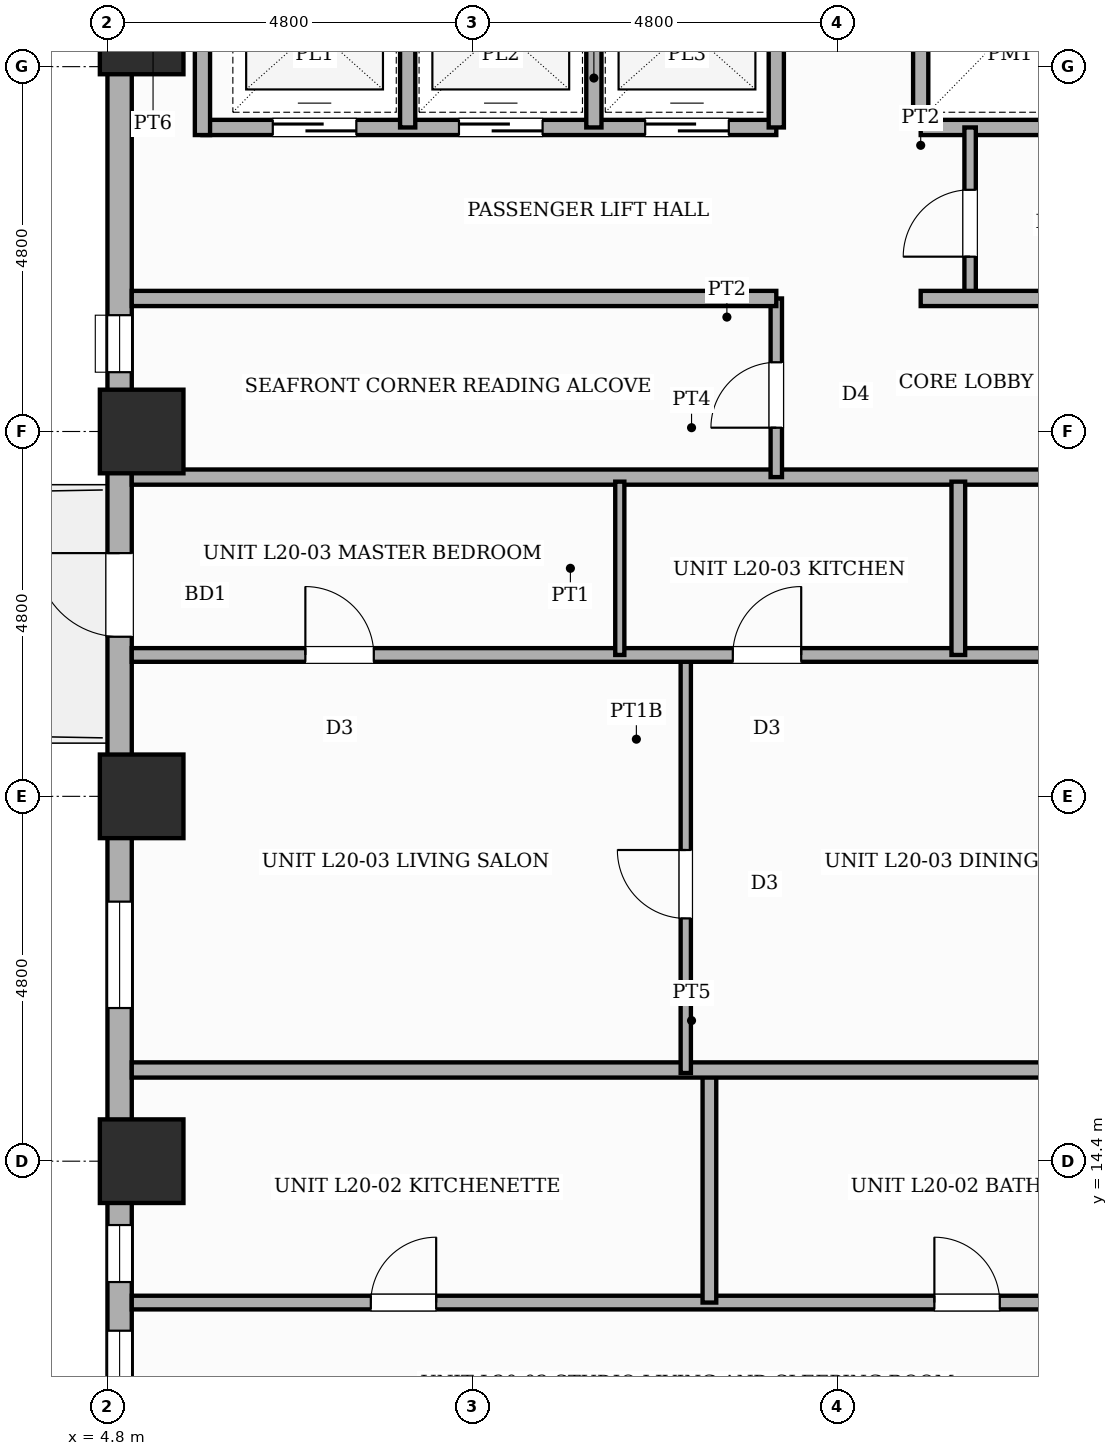
"""IFC4 building model, lengths in metres.
Left out: names, types, materials, properties, quantities, classifications, styles, units other than length and angle.
Written with IfcOpenShell. Run it as: python <this file> out.ifc"""

import sys

from ifc_helpers import new_model, si_unit, direction, frame, frame_2d, origin, origin_2d, place, context, subcontext, project, spatial, rectangle, extrude, element, fill, save


model = new_model("IFC4")
c1 = context("Model", 3, precision=1e-05, world=origin(), true_north=direction((0.0, 1.0)))
c2 = subcontext(c1, "Body", "Model", "MODEL_VIEW")
j1 = project(units=[si_unit("LENGTHUNIT", "METRE"), si_unit("PLANEANGLEUNIT", "RADIAN")], contexts=[c1])
p1 = place(None, origin())
s1 = spatial("IfcSite", under=j1, at=p1, CompositionType="ELEMENT")
p2 = place(p1, origin())
s2 = spatial("IfcBuilding", under=s1, at=p2, CompositionType="ELEMENT")
p3 = place(p2, frame((0.0, 0.0, 79.0)))
s3 = spatial("IfcBuildingStorey", under=s2, at=p3, CompositionType="ELEMENT", Elevation=79.0)
for number, where, z_axis, x_axis in (
    (1, (5.25, 14.4, 0.0), (0.0, 0.0, 1.0), (1.0, 0.0, 0.0)),
    (2, (5.25, 19.2, 0.0), (0.0, 0.0, 1.0), (1.0, 0.0, 0.0)),
    (3, (5.25, 24.0, 0.0), (0.0, 0.0, 1.0), (1.0, 0.0, 0.0)),
    (4, (5.25, 29.25, 0.0), (0.0, 0.0, 1.0), (1.0, 0.0, 0.0)),
):
    element("IfcColumn", number, at=place(p3, frame(where, z_axis=z_axis, x_axis=x_axis)), inside=s3, PredefinedType="COLUMN", context=c2, shape_type="SweptSolid", body=[
        extrude(rectangle(XDim=1.1, YDim=1.1, at=origin_2d()), origin(), (0.0, 0.0, 1.0), 3.6),
    ])
p4 = place(p3, frame((4.96, 7.2, 0.0), z_axis=(0.0, 0.0, 1.0), x_axis=(0.0, 1.0, 0.0)))
e5 = element("IfcWall", 5, at=p4, inside=s3, PredefinedType="STANDARD", context=c2, shape_type="SweptSolid", body=[
    extrude(rectangle(XDim=38.4, YDim=0.32, at=frame_2d((19.2, 0.0))), origin(), (0.0, 0.0, 1.0), 2.53),
])
p5 = place(p4, frame((14.1, 0.0, 0.0)))
e6 = element("IfcOpeningElement", 6, at=p5, cuts=e5, PredefinedType="OPENING", context=c2, shape_type="SweptSolid", body=[
    extrude(rectangle(XDim=1.1, YDim=2.15, at=frame_2d((0.55, 1.075))), frame((0.0, 0.17, 0.0), z_axis=(0.0, -1.0, 0.0), x_axis=(1.0, 0.0, 0.0)), (0.0, 0.0, 1.0), 0.34),
])
p6 = place(p4, frame((3.57, 0.0, 0.65)))
e7 = element("IfcOpeningElement", 7, at=p6, cuts=e5, PredefinedType="OPENING", context=c2, shape_type="SweptSolid", body=[
    extrude(rectangle(XDim=1.4, YDim=1.1, at=frame_2d((0.7, 0.55))), frame((0.0, 0.17, 0.0), z_axis=(0.0, -1.0, 0.0), x_axis=(1.0, 0.0, 0.0)), (0.0, 0.0, 1.0), 0.34),
])
p7 = place(p4, frame((0.611, 0.0, 0.45)))
e8 = element("IfcOpeningElement", 8, at=p7, cuts=e5, PredefinedType="OPENING", context=c2, shape_type="SweptSolid", body=[
    extrude(rectangle(XDim=0.95, YDim=1.8, at=frame_2d((0.475, 0.9))), frame((0.0, 0.17, 0.0), z_axis=(0.0, -1.0, 0.0), x_axis=(1.0, 0.0, 0.0)), (0.0, 0.0, 1.0), 0.34),
])
p8 = place(p4, frame((5.61, 0.0, 0.45)))
e9 = element("IfcOpeningElement", 9, at=p8, cuts=e5, PredefinedType="OPENING", context=c2, shape_type="SweptSolid", body=[
    extrude(rectangle(XDim=0.75, YDim=1.8, at=frame_2d((0.375, 0.9))), frame((0.0, 0.17, 0.0), z_axis=(0.0, -1.0, 0.0), x_axis=(1.0, 0.0, 0.0)), (0.0, 0.0, 1.0), 0.34),
])
p9 = place(p4, frame((9.215, 0.0, 0.65)))
e10 = element("IfcOpeningElement", 10, at=p9, cuts=e5, PredefinedType="OPENING", context=c2, shape_type="SweptSolid", body=[
    extrude(rectangle(XDim=1.4, YDim=1.1, at=frame_2d((0.7, 0.55))), frame((0.0, 0.17, 0.0), z_axis=(0.0, -1.0, 0.0), x_axis=(1.0, 0.0, 0.0)), (0.0, 0.0, 1.0), 0.34),
])
p10 = place(p4, frame((17.58, 0.0, 0.45)))
e11 = element("IfcOpeningElement", 11, at=p10, cuts=e5, PredefinedType="OPENING", context=c2, shape_type="SweptSolid", body=[
    extrude(rectangle(XDim=0.75, YDim=1.8, at=frame_2d((0.375, 0.9))), frame((0.0, 0.17, 0.0), z_axis=(0.0, -1.0, 0.0), x_axis=(1.0, 0.0, 0.0)), (0.0, 0.0, 1.0), 0.34),
])
p11 = place(p3, frame((6.05, 28.0, 0.0), z_axis=(0.0, 0.0, 1.0), x_axis=(1.0, 0.0, 0.0)))
e12 = element("IfcWall", 12, at=p11, inside=s3, PredefinedType="POLYGONAL", context=c2, shape_type="SweptSolid", body=[
    extrude(rectangle(XDim=7.55, YDim=0.2, at=frame_2d((3.775, 0.0))), origin(), (0.0, 0.0, 1.0), 3.35),
])
p12 = place(p11, frame((0.925, 0.0, 0.0)))
e13 = element("IfcOpeningElement", 13, at=p12, cuts=e12, PredefinedType="OPENING", context=c2, shape_type="SweptSolid", body=[
    extrude(rectangle(XDim=1.1, YDim=2.15, at=frame_2d((0.55, 1.075))), frame((0.0, 0.11, 0.0), z_axis=(0.0, -1.0, 0.0), x_axis=(1.0, 0.0, 0.0)), (0.0, 0.0, 1.0), 0.22),
])
p13 = place(p11, frame((3.375, 0.0, 0.0)))
e14 = element("IfcOpeningElement", 14, at=p13, cuts=e12, PredefinedType="OPENING", context=c2, shape_type="SweptSolid", body=[
    extrude(rectangle(XDim=1.1, YDim=2.15, at=frame_2d((0.55, 1.075))), frame((0.0, 0.11, 0.0), z_axis=(0.0, -1.0, 0.0), x_axis=(1.0, 0.0, 0.0)), (0.0, 0.0, 1.0), 0.22),
])
p14 = place(p11, frame((5.825, 0.0, 0.0)))
e15 = element("IfcOpeningElement", 15, at=p14, cuts=e12, PredefinedType="OPENING", context=c2, shape_type="SweptSolid", body=[
    extrude(rectangle(XDim=1.1, YDim=2.15, at=frame_2d((0.55, 1.075))), frame((0.0, 0.11, 0.0), z_axis=(0.0, -1.0, 0.0), x_axis=(1.0, 0.0, 0.0)), (0.0, 0.0, 1.0), 0.22),
])
p15 = place(p3, frame((15.5, 28.0, 0.0), z_axis=(0.0, 0.0, 1.0), x_axis=(1.0, 0.0, 0.0)))
e16 = element("IfcWall", 16, at=p15, inside=s3, PredefinedType="POLYGONAL", context=c2, shape_type="SweptSolid", body=[
    extrude(rectangle(XDim=7.25, YDim=0.2, at=frame_2d((3.625, 0.0))), origin(), (0.0, 0.0, 1.0), 3.35),
])
p16 = place(p3, frame((6.05, 27.9, 0.0), z_axis=(0.0, 0.0, 1.0), x_axis=(0.0, 1.0, 0.0)))
e17 = element("IfcWall", 17, at=p16, inside=s3, PredefinedType="POLYGONAL", context=c2, shape_type="SweptSolid", body=[
    extrude(rectangle(XDim=3.0, YDim=0.2, at=frame_2d((1.5, 0.0))), origin(), (0.0, 0.0, 1.0), 3.35),
])
for number, where, z_axis, x_axis in (
    (18, (13.6, 28.0, 0.0), (0.0, 0.0, 1.0), (0.0, 1.0, 0.0)),
    (19, (15.5, 28.0, 0.0), (0.0, 0.0, 1.0), (0.0, 1.0, 0.0)),
    (20, (8.75, 28.0, 0.0), (0.0, 0.0, 1.0), (0.0, 1.0, 0.0)),
    (21, (11.2, 28.0, 0.0), (0.0, 0.0, 1.0), (0.0, 1.0, 0.0)),
):
    element("IfcWall", number, at=place(p3, frame(where, z_axis=z_axis, x_axis=x_axis)), inside=s3, PredefinedType="POLYGONAL", context=c2, shape_type="SweptSolid", body=[
        extrude(rectangle(XDim=2.9, YDim=0.2, at=frame_2d((1.45, 0.0))), origin(), (0.0, 0.0, 1.0), 3.35),
    ])
p17 = place(p3, frame((16.15, 25.75, 0.0), z_axis=(0.0, 0.0, 1.0), x_axis=(0.0, 1.0, 0.0)))
e22 = element("IfcWall", 22, at=p17, inside=s3, PredefinedType="PARTITIONING", context=c2, shape_type="SweptSolid", body=[
    extrude(rectangle(XDim=2.25, YDim=0.15, at=frame_2d((1.125, 0.0))), origin(), (0.0, 0.0, 1.0), 3.35),
])
p18 = place(p17, frame((0.55, 0.0, 0.0)))
e23 = element("IfcOpeningElement", 23, at=p18, cuts=e22, PredefinedType="OPENING", context=c2, shape_type="SweptSolid", body=[
    extrude(rectangle(XDim=0.88, YDim=2.1, at=frame_2d((0.44, 1.05))), frame((0.0, 0.085, 0.0), z_axis=(0.0, -1.0, 0.0), x_axis=(1.0, 0.0, 0.0)), (0.0, 0.0, 1.0), 0.17),
])
p19 = place(p3, frame((5.12, 23.4, 0.0), z_axis=(0.0, 0.0, 1.0), x_axis=(1.0, 0.0, 0.0)))
e24 = element("IfcWall", 24, at=p19, inside=s3, PredefinedType="PARTITIONING", context=c2, shape_type="SweptSolid", body=[
    extrude(rectangle(XDim=14.73, YDim=0.2, at=frame_2d((7.365, 0.0))), origin(), (0.0, 0.0, 1.0), 3.35),
])
p20 = place(p3, frame((15.5, 25.75, 0.0), z_axis=(0.0, 0.0, 1.0), x_axis=(1.0, 0.0, 0.0)))
e25 = element("IfcWall", 25, at=p20, inside=s3, PredefinedType="PARTITIONING", context=c2, shape_type="SweptSolid", body=[
    extrude(rectangle(XDim=8.18, YDim=0.2, at=frame_2d((4.09, 0.0))), origin(), (0.0, 0.0, 1.0), 3.35),
])
p21 = place(p3, frame((13.6, 23.4, 0.0), z_axis=(0.0, 0.0, 1.0), x_axis=(0.0, 1.0, 0.0)))
e26 = element("IfcWall", 26, at=p21, inside=s3, PredefinedType="PARTITIONING", context=c2, shape_type="SweptSolid", body=[
    extrude(rectangle(XDim=2.35, YDim=0.15, at=frame_2d((1.175, 0.0))), origin(), (0.0, 0.0, 1.0), 3.35),
])
p22 = place(p21, frame((0.65, 0.0, 0.0)))
e27 = element("IfcOpeningElement", 27, at=p22, cuts=e26, PredefinedType="OPENING", context=c2, shape_type="SweptSolid", body=[
    extrude(rectangle(XDim=0.86, YDim=2.1, at=frame_2d((0.43, 1.05))), frame((0.0, 0.085, 0.0), z_axis=(0.0, -1.0, 0.0), x_axis=(1.0, 0.0, 0.0)), (0.0, 0.0, 1.0), 0.17),
])
p23 = place(p3, frame((5.12, 25.75, 0.0), z_axis=(0.0, 0.0, 1.0), x_axis=(1.0, 0.0, 0.0)))
e28 = element("IfcWall", 28, at=p23, inside=s3, PredefinedType="PARTITIONING", context=c2, shape_type="SweptSolid", body=[
    extrude(rectangle(XDim=8.48, YDim=0.2, at=frame_2d((4.24, 0.0))), origin(), (0.0, 0.0, 1.0), 3.35),
])
p24 = place(p3, frame((5.12, 12.54, 0.0), z_axis=(0.0, 0.0, 1.0), x_axis=(1.0, 0.0, 0.0)))
e29 = element("IfcWall", 29, at=p24, inside=s3, PredefinedType="PLUMBINGWALL", context=c2, shape_type="SweptSolid", body=[
    extrude(rectangle(XDim=14.67, YDim=0.18, at=frame_2d((7.335, 0.0))), origin(), (0.0, 0.0, 1.0), 3.35),
])
p25 = place(p24, frame((3.145, 0.0, 0.0)))
e30 = element("IfcOpeningElement", 30, at=p25, cuts=e29, PredefinedType="OPENING", context=c2, shape_type="SweptSolid", body=[
    extrude(rectangle(XDim=0.86, YDim=2.1, at=frame_2d((0.43, 1.05))), frame((0.0, 0.1, 0.0), z_axis=(0.0, -1.0, 0.0), x_axis=(1.0, 0.0, 0.0)), (0.0, 0.0, 1.0), 0.2),
])
p26 = place(p24, frame((10.56, 0.0, 0.0)))
e31 = element("IfcOpeningElement", 31, at=p26, cuts=e29, PredefinedType="OPENING", context=c2, shape_type="SweptSolid", body=[
    extrude(rectangle(XDim=0.86, YDim=2.1, at=frame_2d((0.43, 1.05))), frame((0.0, 0.1, 0.0), z_axis=(0.0, -1.0, 0.0), x_axis=(1.0, 0.0, 0.0)), (0.0, 0.0, 1.0), 0.2),
])
p27 = place(p3, frame((12.72, 12.54, 0.0), z_axis=(0.0, 0.0, 1.0), x_axis=(0.0, 1.0, 0.0)))
e32 = element("IfcWall", 32, at=p27, inside=s3, PredefinedType="PLUMBINGWALL", context=c2, shape_type="SweptSolid", body=[
    extrude(rectangle(XDim=3.1, YDim=0.18, at=frame_2d((1.55, 0.0))), origin(), (0.0, 0.0, 1.0), 3.35),
])
p28 = place(p3, frame((5.12, 15.6, 0.0), z_axis=(0.0, 0.0, 1.0), x_axis=(1.0, 0.0, 0.0)))
e33 = element("IfcWall", 33, at=p28, inside=s3, PredefinedType="SOLIDWALL", context=c2, shape_type="SweptSolid", body=[
    extrude(rectangle(XDim=14.73, YDim=0.2, at=frame_2d((7.365, 0.0))), origin(), (0.0, 0.0, 1.0), 3.35),
])
p29 = place(p3, frame((12.409, 15.56, 0.0), z_axis=(0.0, 0.0, 1.0), x_axis=(0.0, 1.0, 0.0)))
e34 = element("IfcWall", 34, at=p29, inside=s3, PredefinedType="PARTITIONING", context=c2, shape_type="SweptSolid", body=[
    extrude(rectangle(XDim=5.5, YDim=0.135, at=frame_2d((2.75, 0.0))), origin(), (0.0, 0.0, 1.0), 3.35),
])
p30 = place(p29, frame((2.034, 0.0, 0.0)))
e35 = element("IfcOpeningElement", 35, at=p30, cuts=e34, PredefinedType="OPENING", context=c2, shape_type="SweptSolid", body=[
    extrude(rectangle(XDim=0.9, YDim=2.15, at=frame_2d((0.45, 1.075))), frame((0.0, 0.078, 0.0), z_axis=(0.0, -1.0, 0.0), x_axis=(1.0, 0.0, 0.0)), (0.0, 0.0, 1.0), 0.155),
])
p31 = place(p3, frame((5.12, 21.06, 0.0), z_axis=(0.0, 0.0, 1.0), x_axis=(1.0, 0.0, 0.0)))
e36 = element("IfcWall", 36, at=p31, inside=s3, PredefinedType="PLUMBINGWALL", context=c2, shape_type="SweptSolid", body=[
    extrude(rectangle(XDim=14.67, YDim=0.18, at=frame_2d((7.335, 0.0))), origin(), (0.0, 0.0, 1.0), 3.35),
])
p32 = place(p31, frame((2.284, 0.0, 0.0)))
e37 = element("IfcOpeningElement", 37, at=p32, cuts=e36, PredefinedType="OPENING", context=c2, shape_type="SweptSolid", body=[
    extrude(rectangle(XDim=0.9, YDim=2.15, at=frame_2d((0.45, 1.075))), frame((0.0, 0.1, 0.0), z_axis=(0.0, -1.0, 0.0), x_axis=(1.0, 0.0, 0.0)), (0.0, 0.0, 1.0), 0.2),
])
p33 = place(p31, frame((7.908, 0.0, 0.0)))
e38 = element("IfcOpeningElement", 38, at=p33, cuts=e36, PredefinedType="OPENING", context=c2, shape_type="SweptSolid", body=[
    extrude(rectangle(XDim=0.9, YDim=2.15, at=frame_2d((0.45, 1.075))), frame((0.0, 0.1, 0.0), z_axis=(0.0, -1.0, 0.0), x_axis=(1.0, 0.0, 0.0)), (0.0, 0.0, 1.0), 0.2),
])
p34 = place(p31, frame((12.088, 0.0, 0.0)))
e39 = element("IfcOpeningElement", 39, at=p34, cuts=e36, PredefinedType="OPENING", context=c2, shape_type="SweptSolid", body=[
    extrude(rectangle(XDim=0.86, YDim=2.1, at=frame_2d((0.43, 1.05))), frame((0.0, 0.1, 0.0), z_axis=(0.0, -1.0, 0.0), x_axis=(1.0, 0.0, 0.0)), (0.0, 0.0, 1.0), 0.2),
])
p35 = place(p3, frame((11.541, 21.06, 0.0), z_axis=(0.0, 0.0, 1.0), x_axis=(0.0, 1.0, 0.0)))
e40 = element("IfcWall", 40, at=p35, inside=s3, PredefinedType="PARTITIONING", context=c2, shape_type="SweptSolid", body=[
    extrude(rectangle(XDim=2.28, YDim=0.12, at=frame_2d((1.14, 0.0))), origin(), (0.0, 0.0, 1.0), 3.35),
])
p36 = place(p3, frame((15.995, 21.06, 0.0), z_axis=(0.0, 0.0, 1.0), x_axis=(0.0, 1.0, 0.0)))
e41 = element("IfcWall", 41, at=p36, inside=s3, PredefinedType="PLUMBINGWALL", context=c2, shape_type="SweptSolid", body=[
    extrude(rectangle(XDim=2.28, YDim=0.18, at=frame_2d((1.14, 0.0))), origin(), (0.0, 0.0, 1.0), 3.35),
])
p37 = place(p5, origin())
e42 = element("IfcDoor", 42, at=p37, inside=s3, OperationType="SINGLE_SWING_RIGHT", PredefinedType="DOOR", context=c2, shape_type="SweptSolid", body=[
    extrude(rectangle(XDim=1.1, YDim=2.15, at=frame_2d((0.55, 1.075))), frame((0.0, 0.025, 0.0), z_axis=(0.0, -1.0, 0.0), x_axis=(1.0, 0.0, 0.0)), (0.0, 0.0, 1.0), 0.05),
])
fill(e6, e42)
p38 = place(p6, origin())
e43 = element("IfcWindow", 43, at=p38, inside=s3, PartitioningType="SINGLE_PANEL", PredefinedType="WINDOW", context=c2, shape_type="SweptSolid", body=[
    extrude(rectangle(XDim=1.4, YDim=1.1, at=frame_2d((0.7, 0.55))), frame((0.0, 0.03, 0.0), z_axis=(0.0, -1.0, 0.0), x_axis=(1.0, 0.0, 0.0)), (0.0, 0.0, 1.0), 0.06),
])
fill(e7, e43)
p39 = place(p8, origin())
e44 = element("IfcWindow", 44, at=p39, inside=s3, PartitioningType="SINGLE_PANEL", PredefinedType="WINDOW", context=c2, shape_type="SweptSolid", body=[
    extrude(rectangle(XDim=0.75, YDim=1.8, at=frame_2d((0.375, 0.9))), frame((0.0, 0.03, 0.0), z_axis=(0.0, -1.0, 0.0), x_axis=(1.0, 0.0, 0.0)), (0.0, 0.0, 1.0), 0.06),
])
fill(e9, e44)
p40 = place(p9, origin())
e45 = element("IfcWindow", 45, at=p40, inside=s3, PartitioningType="SINGLE_PANEL", PredefinedType="WINDOW", context=c2, shape_type="SweptSolid", body=[
    extrude(rectangle(XDim=1.4, YDim=1.1, at=frame_2d((0.7, 0.55))), frame((0.0, 0.03, 0.0), z_axis=(0.0, -1.0, 0.0), x_axis=(1.0, 0.0, 0.0)), (0.0, 0.0, 1.0), 0.06),
])
fill(e10, e45)
p41 = place(p10, origin())
e46 = element("IfcWindow", 46, at=p41, inside=s3, PartitioningType="SINGLE_PANEL", PredefinedType="WINDOW", context=c2, shape_type="SweptSolid", body=[
    extrude(rectangle(XDim=0.75, YDim=1.8, at=frame_2d((0.375, 0.9))), frame((0.0, 0.03, 0.0), z_axis=(0.0, -1.0, 0.0), x_axis=(1.0, 0.0, 0.0)), (0.0, 0.0, 1.0), 0.06),
])
fill(e11, e46)
p42 = place(p12, origin())
e47 = element("IfcDoor", 47, at=p42, inside=s3, OperationType="SLIDING_TO_LEFT", PredefinedType="DOOR", context=c2, shape_type="SweptSolid", body=[
    extrude(rectangle(XDim=1.1, YDim=2.15, at=frame_2d((0.55, 1.075))), frame((0.0, 0.025, 0.0), z_axis=(0.0, -1.0, 0.0), x_axis=(1.0, 0.0, 0.0)), (0.0, 0.0, 1.0), 0.05),
])
fill(e13, e47)
p43 = place(p13, origin())
e48 = element("IfcDoor", 48, at=p43, inside=s3, OperationType="SLIDING_TO_RIGHT", PredefinedType="DOOR", context=c2, shape_type="SweptSolid", body=[
    extrude(rectangle(XDim=1.1, YDim=2.15, at=frame_2d((0.55, 1.075))), frame((0.0, 0.025, 0.0), z_axis=(0.0, -1.0, 0.0), x_axis=(1.0, 0.0, 0.0)), (0.0, 0.0, 1.0), 0.05),
])
fill(e14, e48)
p44 = place(p14, origin())
e49 = element("IfcDoor", 49, at=p44, inside=s3, OperationType="SLIDING_TO_LEFT", PredefinedType="DOOR", context=c2, shape_type="SweptSolid", body=[
    extrude(rectangle(XDim=1.1, YDim=2.15, at=frame_2d((0.55, 1.075))), frame((0.0, 0.025, 0.0), z_axis=(0.0, -1.0, 0.0), x_axis=(1.0, 0.0, 0.0)), (0.0, 0.0, 1.0), 0.05),
])
fill(e15, e49)
p45 = place(p18, origin())
e50 = element("IfcDoor", 50, at=p45, inside=s3, OperationType="SINGLE_SWING_LEFT", PredefinedType="DOOR", context=c2, shape_type="SweptSolid", body=[
    extrude(rectangle(XDim=0.88, YDim=2.1, at=frame_2d((0.44, 1.05))), frame((0.0, 0.025, 0.0), z_axis=(0.0, -1.0, 0.0), x_axis=(1.0, 0.0, 0.0)), (0.0, 0.0, 1.0), 0.05),
])
fill(e23, e50)
p46 = place(p22, origin())
e51 = element("IfcDoor", 51, at=p46, inside=s3, OperationType="SINGLE_SWING_LEFT", PredefinedType="DOOR", context=c2, shape_type="SweptSolid", body=[
    extrude(rectangle(XDim=0.86, YDim=2.1, at=frame_2d((0.43, 1.05))), frame((0.0, 0.025, 0.0), z_axis=(0.0, -1.0, 0.0), x_axis=(1.0, 0.0, 0.0)), (0.0, 0.0, 1.0), 0.05),
])
fill(e27, e51)
p47 = place(p25, origin())
e52 = element("IfcDoor", 52, at=p47, inside=s3, OperationType="SINGLE_SWING_RIGHT", PredefinedType="DOOR", context=c2, shape_type="SweptSolid", body=[
    extrude(rectangle(XDim=0.86, YDim=2.1, at=frame_2d((0.43, 1.05))), frame((0.0, 0.025, 0.0), z_axis=(0.0, -1.0, 0.0), x_axis=(1.0, 0.0, 0.0)), (0.0, 0.0, 1.0), 0.05),
])
fill(e30, e52)
p48 = place(p26, origin())
e53 = element("IfcDoor", 53, at=p48, inside=s3, OperationType="SINGLE_SWING_LEFT", PredefinedType="DOOR", context=c2, shape_type="SweptSolid", body=[
    extrude(rectangle(XDim=0.86, YDim=2.1, at=frame_2d((0.43, 1.05))), frame((0.0, 0.025, 0.0), z_axis=(0.0, -1.0, 0.0), x_axis=(1.0, 0.0, 0.0)), (0.0, 0.0, 1.0), 0.05),
])
fill(e31, e53)
p49 = place(p30, origin())
e54 = element("IfcDoor", 54, at=p49, inside=s3, OperationType="SINGLE_SWING_RIGHT", PredefinedType="DOOR", context=c2, shape_type="SweptSolid", body=[
    extrude(rectangle(XDim=0.9, YDim=2.15, at=frame_2d((0.45, 1.075))), frame((0.0, 0.025, 0.0), z_axis=(0.0, -1.0, 0.0), x_axis=(1.0, 0.0, 0.0)), (0.0, 0.0, 1.0), 0.05),
])
fill(e35, e54)
p50 = place(p32, origin())
e55 = element("IfcDoor", 55, at=p50, inside=s3, OperationType="SINGLE_SWING_LEFT", PredefinedType="DOOR", context=c2, shape_type="SweptSolid", body=[
    extrude(rectangle(XDim=0.9, YDim=2.15, at=frame_2d((0.45, 1.075))), frame((0.0, 0.025, 0.0), z_axis=(0.0, -1.0, 0.0), x_axis=(1.0, 0.0, 0.0)), (0.0, 0.0, 1.0), 0.05),
])
fill(e37, e55)
p51 = place(p33, origin())
e56 = element("IfcDoor", 56, at=p51, inside=s3, OperationType="SINGLE_SWING_RIGHT", PredefinedType="DOOR", context=c2, shape_type="SweptSolid", body=[
    extrude(rectangle(XDim=0.9, YDim=2.15, at=frame_2d((0.45, 1.075))), frame((0.0, 0.025, 0.0), z_axis=(0.0, -1.0, 0.0), x_axis=(1.0, 0.0, 0.0)), (0.0, 0.0, 1.0), 0.05),
])
fill(e38, e56)
save(model, sys.argv[1])
